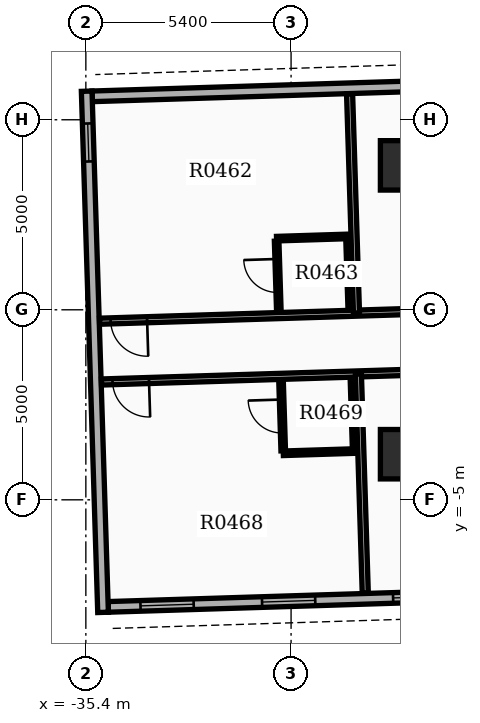
"""IFC4 building model, lengths in metres.
Left out: names, types, materials, properties, quantities, classifications, styles, units other than length and angle.
Written with IfcOpenShell. Run it as: python <this file> out.ifc"""

import sys

from ifc_helpers import new_model, si_unit, direction, frame, frame_2d, origin, origin_2d, place, context, subcontext, project, spatial, rectangle, extrude, element, fill, save


model = new_model("IFC4")
c1 = context("Model", 3, precision=1e-05, world=origin(), true_north=direction((0.0, 1.0)))
c2 = subcontext(c1, "Body", "Model", "MODEL_VIEW")
j1 = project(units=[si_unit("LENGTHUNIT", "METRE"), si_unit("PLANEANGLEUNIT", "RADIAN")], contexts=[c1])
p1 = place(None, origin())
s1 = spatial("IfcSite", under=j1, at=p1, CompositionType="ELEMENT")
p2 = place(p1, origin())
s2 = spatial("IfcBuilding", under=s1, at=p2, CompositionType="ELEMENT")
p3 = place(p2, frame((0.0, 0.0, 31.5)))
s3 = spatial("IfcBuildingStorey", under=s2, at=p3, CompositionType="ELEMENT", Elevation=31.5)
for number, where, z_axis, x_axis in (
    (1, (-27.0, -3.8, 0.0), (0.0, 0.0, 1.0), (1.0, 0.0, 0.0)),
    (2, (-27.0, 3.8, 0.0), (0.0, 0.0, 1.0), (1.0, 0.0, 0.0)),
):
    element("IfcColumn", number, at=place(p3, frame(where, z_axis=z_axis, x_axis=x_axis)), inside=s3, PredefinedType="COLUMN", context=c2, shape_type="SweptSolid", body=[
        extrude(rectangle(XDim=1.3, YDim=1.3, at=origin_2d()), origin(), (0.0, 0.0, 1.0), 3.9),
    ])
p4 = place(p3, frame((-15.144, 6.247, 0.0), z_axis=(0.0, 0.0, 1.0), x_axis=(-0.999506955354, -0.031398187845, 0.0)))
e3 = element("IfcWall", 3, at=p4, inside=s3, PredefinedType="STANDARD", context=c2, shape_type="SweptSolid", body=[
    extrude(rectangle(XDim=20.1, YDim=0.28, at=frame_2d((10.05, 0.0))), origin(), (0.0, 0.0, 1.0), 2.91),
])
p5 = place(p4, frame((0.85, 0.0, 0.8)))
e4 = element("IfcOpeningElement", 4, at=p5, cuts=e3, PredefinedType="OPENING", context=c2, shape_type="SweptSolid", body=[
    extrude(rectangle(XDim=1.4, YDim=1.6, at=frame_2d((0.7, 0.8))), frame((0.0, 0.15, 0.0), z_axis=(0.0, -1.0, 0.0), x_axis=(1.0, 0.0, 0.0)), (0.0, 0.0, 1.0), 0.3),
])
p6 = place(p4, frame((4.05, 0.0, 0.8)))
e5 = element("IfcOpeningElement", 5, at=p6, cuts=e3, PredefinedType="OPENING", context=c2, shape_type="SweptSolid", body=[
    extrude(rectangle(XDim=1.4, YDim=1.6, at=frame_2d((0.7, 0.8))), frame((0.0, 0.15, 0.0), z_axis=(0.0, -1.0, 0.0), x_axis=(1.0, 0.0, 0.0)), (0.0, 0.0, 1.0), 0.3),
])
p7 = place(p4, frame((7.25, 0.0, 0.8)))
e6 = element("IfcOpeningElement", 6, at=p7, cuts=e3, PredefinedType="OPENING", context=c2, shape_type="SweptSolid", body=[
    extrude(rectangle(XDim=1.4, YDim=1.6, at=frame_2d((0.7, 0.8))), frame((0.0, 0.15, 0.0), z_axis=(0.0, -1.0, 0.0), x_axis=(1.0, 0.0, 0.0)), (0.0, 0.0, 1.0), 0.3),
])
p8 = place(p4, frame((10.45, 0.0, 0.8)))
e7 = element("IfcOpeningElement", 7, at=p8, cuts=e3, PredefinedType="OPENING", context=c2, shape_type="SweptSolid", body=[
    extrude(rectangle(XDim=1.4, YDim=1.6, at=frame_2d((0.7, 0.8))), frame((0.0, 0.15, 0.0), z_axis=(0.0, -1.0, 0.0), x_axis=(1.0, 0.0, 0.0)), (0.0, 0.0, 1.0), 0.3),
])
p9 = place(p3, frame((-34.812, -7.817, 0.0), z_axis=(0.0, 0.0, 1.0), x_axis=(0.999506574096, 0.031410322165, 0.0)))
e8 = element("IfcWall", 8, at=p9, inside=s3, PredefinedType="STANDARD", context=c2, shape_type="SweptSolid", body=[
    extrude(rectangle(XDim=20.1, YDim=0.28, at=frame_2d((10.05, 0.0))), origin(), (0.0, 0.0, 1.0), 2.91),
])
p10 = place(p9, frame((0.85, 0.0, 0.8)))
e9 = element("IfcOpeningElement", 9, at=p10, cuts=e8, PredefinedType="OPENING", context=c2, shape_type="SweptSolid", body=[
    extrude(rectangle(XDim=1.4, YDim=1.6, at=frame_2d((0.7, 0.8))), frame((0.0, 0.15, 0.0), z_axis=(0.0, -1.0, 0.0), x_axis=(1.0, 0.0, 0.0)), (0.0, 0.0, 1.0), 0.3),
])
p11 = place(p9, frame((4.05, 0.0, 0.8)))
e10 = element("IfcOpeningElement", 10, at=p11, cuts=e8, PredefinedType="OPENING", context=c2, shape_type="SweptSolid", body=[
    extrude(rectangle(XDim=1.4, YDim=1.6, at=frame_2d((0.7, 0.8))), frame((0.0, 0.15, 0.0), z_axis=(0.0, -1.0, 0.0), x_axis=(1.0, 0.0, 0.0)), (0.0, 0.0, 1.0), 0.3),
])
p12 = place(p9, frame((7.5, 0.0, 0.8)))
e11 = element("IfcOpeningElement", 11, at=p12, cuts=e8, PredefinedType="OPENING", context=c2, shape_type="SweptSolid", body=[
    extrude(rectangle(XDim=1.4, YDim=1.6, at=frame_2d((0.7, 0.8))), frame((0.0, 0.15, 0.0), z_axis=(0.0, -1.0, 0.0), x_axis=(1.0, 0.0, 0.0)), (0.0, 0.0, 1.0), 0.3),
])
p13 = place(p9, frame((10.7, 0.0, 0.8)))
e12 = element("IfcOpeningElement", 12, at=p13, cuts=e8, PredefinedType="OPENING", context=c2, shape_type="SweptSolid", body=[
    extrude(rectangle(XDim=1.4, YDim=1.6, at=frame_2d((0.7, 0.8))), frame((0.0, 0.15, 0.0), z_axis=(0.0, -1.0, 0.0), x_axis=(1.0, 0.0, 0.0)), (0.0, 0.0, 1.0), 0.3),
])
p14 = place(p9, frame((14.799, 0.0, 0.85)))
e13 = element("IfcOpeningElement", 13, at=p14, cuts=e8, PredefinedType="OPENING", context=c2, shape_type="SweptSolid", body=[
    extrude(rectangle(XDim=1.2, YDim=1.6, at=frame_2d((0.6, 0.8))), frame((0.0, 0.15, 0.0), z_axis=(0.0, -1.0, 0.0), x_axis=(1.0, 0.0, 0.0)), (0.0, 0.0, 1.0), 0.3),
])
p15 = place(p3, frame((-35.378, 5.752, 0.0), z_axis=(0.0, 0.0, 1.0), x_axis=(0.031406966164, -0.999506679556, 0.0)))
e14 = element("IfcWall", 14, at=p15, inside=s3, PredefinedType="STANDARD", context=c2, shape_type="SweptSolid", body=[
    extrude(rectangle(XDim=13.72, YDim=0.28, at=frame_2d((6.86, 0.0))), origin(), (0.0, 0.0, 1.0), 2.91),
])
p16 = place(p15, frame((0.85, 0.0, 0.85)))
e15 = element("IfcOpeningElement", 15, at=p16, cuts=e14, PredefinedType="OPENING", context=c2, shape_type="SweptSolid", body=[
    extrude(rectangle(XDim=1.0, YDim=1.5, at=frame_2d((0.5, 0.75))), frame((0.0, 0.15, 0.0), z_axis=(0.0, -1.0, 0.0), x_axis=(1.0, 0.0, 0.0)), (0.0, 0.0, 1.0), 0.3),
])
p17 = place(p3, frame((-14.868, 0.333, 0.0), z_axis=(0.0, 0.0, 1.0), x_axis=(-0.99950639469, -0.031416030536, 0.0)))
e16 = element("IfcWall", 16, at=p17, inside=s3, PredefinedType="PARTITIONING", context=c2, shape_type="SweptSolid", body=[
    extrude(rectangle(XDim=20.182, YDim=0.16, at=frame_2d((10.091, 0.0))), origin(), (0.0, 0.0, 1.0), 2.9),
])
p18 = place(p17, frame((2.61, 0.0, 0.0)))
e17 = element("IfcOpeningElement", 17, at=p18, cuts=e16, PredefinedType="OPENING", context=c2, shape_type="SweptSolid", body=[
    extrude(rectangle(XDim=0.96, YDim=2.15, at=frame_2d((0.48, 1.075))), frame((0.0, 0.09, 0.0), z_axis=(0.0, -1.0, 0.0), x_axis=(1.0, 0.0, 0.0)), (0.0, 0.0, 1.0), 0.18),
])
p19 = place(p17, frame((8.994, 0.0, 0.0)))
e18 = element("IfcOpeningElement", 18, at=p19, cuts=e16, PredefinedType="OPENING", context=c2, shape_type="SweptSolid", body=[
    extrude(rectangle(XDim=0.96, YDim=2.15, at=frame_2d((0.48, 1.075))), frame((0.0, 0.09, 0.0), z_axis=(0.0, -1.0, 0.0), x_axis=(1.0, 0.0, 0.0)), (0.0, 0.0, 1.0), 0.18),
])
p20 = place(p17, frame((18.93, 0.0, 0.0)))
e19 = element("IfcOpeningElement", 19, at=p20, cuts=e16, PredefinedType="OPENING", context=c2, shape_type="SweptSolid", body=[
    extrude(rectangle(XDim=0.96, YDim=2.15, at=frame_2d((0.48, 1.075))), frame((0.0, 0.09, 0.0), z_axis=(0.0, -1.0, 0.0), x_axis=(1.0, 0.0, 0.0)), (0.0, 0.0, 1.0), 0.18),
])
p21 = place(p3, frame((-28.279, -0.088, 0.0), z_axis=(0.0, 0.0, 1.0), x_axis=(-0.031383965651, 0.999507402024, 0.0)))
e20 = element("IfcWall", 20, at=p21, inside=s3, PredefinedType="PARTITIONING", context=c2, shape_type="SweptSolid", body=[
    extrude(rectangle(XDim=5.772, YDim=0.16, at=frame_2d((2.886, 0.0))), origin(), (0.0, 0.0, 1.0), 2.9),
])
p22 = place(p3, frame((-30.323, -0.012, 0.0), z_axis=(0.0, 0.0, 1.0), x_axis=(-0.031389704724, 0.999507221803, 0.0)))
e21 = element("IfcWall", 21, at=p22, inside=s3, PredefinedType="PARTITIONING", context=c2, shape_type="SweptSolid", body=[
    extrude(rectangle(XDim=1.82, YDim=0.12, at=frame_2d((0.91, 0.0))), origin(), (0.0, 0.0, 1.0), 2.9),
])
p23 = place(p22, frame((0.47, 0.0, 0.0)))
e22 = element("IfcOpeningElement", 22, at=p23, cuts=e21, PredefinedType="OPENING", context=c2, shape_type="SweptSolid", body=[
    extrude(rectangle(XDim=0.88, YDim=2.1, at=frame_2d((0.44, 1.05))), frame((0.0, 0.07, 0.0), z_axis=(0.0, -1.0, 0.0), x_axis=(1.0, 0.0, 0.0)), (0.0, 0.0, 1.0), 0.14),
])
p24 = place(p3, frame((-28.444, 0.047, 0.0), z_axis=(0.0, 0.0, 1.0), x_axis=(-0.031389704724, 0.999507221803, 0.0)))
e23 = element("IfcWall", 23, at=p24, inside=s3, PredefinedType="PARTITIONING", context=c2, shape_type="SweptSolid", body=[
    extrude(rectangle(XDim=1.82, YDim=0.12, at=frame_2d((0.91, 0.0))), origin(), (0.0, 0.0, 1.0), 2.9),
])
p25 = place(p3, frame((-28.503, 1.931, 0.0), z_axis=(0.0, 0.0, 1.0), x_axis=(-0.999506103526, -0.031425292588, 0.0)))
e24 = element("IfcWall", 24, at=p25, inside=s3, PredefinedType="PARTITIONING", context=c2, shape_type="SweptSolid", body=[
    extrude(rectangle(XDim=1.88, YDim=0.12, at=frame_2d((0.94, 0.0))), origin(), (0.0, 0.0, 1.0), 2.9),
])
p26 = place(p3, frame((-14.817, -1.266, 0.0), z_axis=(0.0, 0.0, 1.0), x_axis=(-0.9995067864, -0.031403565719, 0.0)))
e25 = element("IfcWall", 25, at=p26, inside=s3, PredefinedType="PARTITIONING", context=c2, shape_type="SweptSolid", body=[
    extrude(rectangle(XDim=20.182, YDim=0.16, at=frame_2d((10.091, 0.0))), origin(), (0.0, 0.0, 1.0), 2.9),
])
p27 = place(p26, frame((2.61, 0.0, 0.0)))
e26 = element("IfcOpeningElement", 26, at=p27, cuts=e25, PredefinedType="OPENING", context=c2, shape_type="SweptSolid", body=[
    extrude(rectangle(XDim=0.96, YDim=2.15, at=frame_2d((0.48, 1.075))), frame((0.0, 0.09, 0.0), z_axis=(0.0, -1.0, 0.0), x_axis=(1.0, 0.0, 0.0)), (0.0, 0.0, 1.0), 0.18),
])
p28 = place(p26, frame((8.994, 0.0, 0.0)))
e27 = element("IfcOpeningElement", 27, at=p28, cuts=e25, PredefinedType="OPENING", context=c2, shape_type="SweptSolid", body=[
    extrude(rectangle(XDim=0.96, YDim=2.15, at=frame_2d((0.48, 1.075))), frame((0.0, 0.09, 0.0), z_axis=(0.0, -1.0, 0.0), x_axis=(1.0, 0.0, 0.0)), (0.0, 0.0, 1.0), 0.18),
])
p29 = place(p26, frame((18.93, 0.0, 0.0)))
e28 = element("IfcOpeningElement", 28, at=p29, cuts=e25, PredefinedType="OPENING", context=c2, shape_type="SweptSolid", body=[
    extrude(rectangle(XDim=0.96, YDim=2.15, at=frame_2d((0.48, 1.075))), frame((0.0, 0.09, 0.0), z_axis=(0.0, -1.0, 0.0), x_axis=(1.0, 0.0, 0.0)), (0.0, 0.0, 1.0), 0.18),
])
p30 = place(p3, frame((-28.229, -1.688, 0.0), z_axis=(0.0, 0.0, 1.0), x_axis=(0.031426220357, -0.999506074356, 0.0)))
e29 = element("IfcWall", 29, at=p30, inside=s3, PredefinedType="PARTITIONING", context=c2, shape_type="SweptSolid", body=[
    extrude(rectangle(XDim=5.772, YDim=0.16, at=frame_2d((2.886, 0.0))), origin(), (0.0, 0.0, 1.0), 2.9),
])
p31 = place(p3, frame((-30.206, -3.711, 0.0), z_axis=(0.0, 0.0, 1.0), x_axis=(-0.031389704724, 0.999507221803, 0.0)))
e30 = element("IfcWall", 30, at=p31, inside=s3, PredefinedType="PARTITIONING", context=c2, shape_type="SweptSolid", body=[
    extrude(rectangle(XDim=1.82, YDim=0.12, at=frame_2d((0.91, 0.0))), origin(), (0.0, 0.0, 1.0), 2.9),
])
p32 = place(p31, frame((0.47, 0.0, 0.0)))
e31 = element("IfcOpeningElement", 31, at=p32, cuts=e30, PredefinedType="OPENING", context=c2, shape_type="SweptSolid", body=[
    extrude(rectangle(XDim=0.88, YDim=2.1, at=frame_2d((0.44, 1.05))), frame((0.0, 0.07, 0.0), z_axis=(0.0, -1.0, 0.0), x_axis=(1.0, 0.0, 0.0)), (0.0, 0.0, 1.0), 0.14),
])
p33 = place(p3, frame((-28.327, -3.652, 0.0), z_axis=(0.0, 0.0, 1.0), x_axis=(-0.031389704724, 0.999507221803, 0.0)))
e32 = element("IfcWall", 32, at=p33, inside=s3, PredefinedType="PARTITIONING", context=c2, shape_type="SweptSolid", body=[
    extrude(rectangle(XDim=1.82, YDim=0.12, at=frame_2d((0.91, 0.0))), origin(), (0.0, 0.0, 1.0), 2.9),
])
p34 = place(p3, frame((-28.325, -3.717, 0.0), z_axis=(0.0, 0.0, 1.0), x_axis=(-0.999506103526, -0.031425292588, 0.0)))
e33 = element("IfcWall", 33, at=p34, inside=s3, PredefinedType="PARTITIONING", context=c2, shape_type="SweptSolid", body=[
    extrude(rectangle(XDim=1.88, YDim=0.12, at=frame_2d((0.94, 0.0))), origin(), (0.0, 0.0, 1.0), 2.9),
])
p35 = place(p10, origin())
e34 = element("IfcWindow", 34, at=p35, inside=s3, PartitioningType="SINGLE_PANEL", PredefinedType="WINDOW", context=c2, shape_type="SweptSolid", body=[
    extrude(rectangle(XDim=1.4, YDim=1.6, at=frame_2d((0.7, 0.8))), frame((0.0, 0.03, 0.0), z_axis=(0.0, -1.0, 0.0), x_axis=(1.0, 0.0, 0.0)), (0.0, 0.0, 1.0), 0.06),
])
fill(e9, e34)
p36 = place(p11, origin())
e35 = element("IfcWindow", 35, at=p36, inside=s3, PartitioningType="SINGLE_PANEL", PredefinedType="WINDOW", context=c2, shape_type="SweptSolid", body=[
    extrude(rectangle(XDim=1.4, YDim=1.6, at=frame_2d((0.7, 0.8))), frame((0.0, 0.03, 0.0), z_axis=(0.0, -1.0, 0.0), x_axis=(1.0, 0.0, 0.0)), (0.0, 0.0, 1.0), 0.06),
])
fill(e10, e35)
p37 = place(p12, origin())
e36 = element("IfcWindow", 36, at=p37, inside=s3, PartitioningType="SINGLE_PANEL", PredefinedType="WINDOW", context=c2, shape_type="SweptSolid", body=[
    extrude(rectangle(XDim=1.4, YDim=1.6, at=frame_2d((0.7, 0.8))), frame((0.0, 0.03, 0.0), z_axis=(0.0, -1.0, 0.0), x_axis=(1.0, 0.0, 0.0)), (0.0, 0.0, 1.0), 0.06),
])
fill(e11, e36)
p38 = place(p16, origin())
e37 = element("IfcWindow", 37, at=p38, inside=s3, PartitioningType="SINGLE_PANEL", PredefinedType="WINDOW", context=c2, shape_type="SweptSolid", body=[
    extrude(rectangle(XDim=1.0, YDim=1.5, at=frame_2d((0.5, 0.75))), frame((0.0, 0.03, 0.0), z_axis=(0.0, -1.0, 0.0), x_axis=(1.0, 0.0, 0.0)), (0.0, 0.0, 1.0), 0.06),
])
fill(e15, e37)
p39 = place(p20, origin())
e38 = element("IfcDoor", 38, at=p39, inside=s3, OperationType="SINGLE_SWING_LEFT", PredefinedType="DOOR", context=c2, shape_type="SweptSolid", body=[
    extrude(rectangle(XDim=0.96, YDim=2.15, at=frame_2d((0.48, 1.075))), frame((0.0, 0.025, 0.0), z_axis=(0.0, -1.0, 0.0), x_axis=(1.0, 0.0, 0.0)), (0.0, 0.0, 1.0), 0.05),
])
fill(e19, e38)
p40 = place(p23, origin())
e39 = element("IfcDoor", 39, at=p40, inside=s3, OperationType="SINGLE_SWING_RIGHT", PredefinedType="DOOR", context=c2, shape_type="SweptSolid", body=[
    extrude(rectangle(XDim=0.88, YDim=2.1, at=frame_2d((0.44, 1.05))), frame((0.0, 0.025, 0.0), z_axis=(0.0, -1.0, 0.0), x_axis=(1.0, 0.0, 0.0)), (0.0, 0.0, 1.0), 0.05),
])
fill(e22, e39)
p41 = place(p29, origin())
e40 = element("IfcDoor", 40, at=p41, inside=s3, OperationType="SINGLE_SWING_LEFT", PredefinedType="DOOR", context=c2, shape_type="SweptSolid", body=[
    extrude(rectangle(XDim=0.96, YDim=2.15, at=frame_2d((0.48, 1.075))), frame((0.0, 0.025, 0.0), z_axis=(0.0, -1.0, 0.0), x_axis=(1.0, 0.0, 0.0)), (0.0, 0.0, 1.0), 0.05),
])
fill(e28, e40)
p42 = place(p32, origin())
e41 = element("IfcDoor", 41, at=p42, inside=s3, OperationType="SINGLE_SWING_RIGHT", PredefinedType="DOOR", context=c2, shape_type="SweptSolid", body=[
    extrude(rectangle(XDim=0.88, YDim=2.1, at=frame_2d((0.44, 1.05))), frame((0.0, 0.025, 0.0), z_axis=(0.0, -1.0, 0.0), x_axis=(1.0, 0.0, 0.0)), (0.0, 0.0, 1.0), 0.05),
])
fill(e31, e41)
save(model, sys.argv[1])
